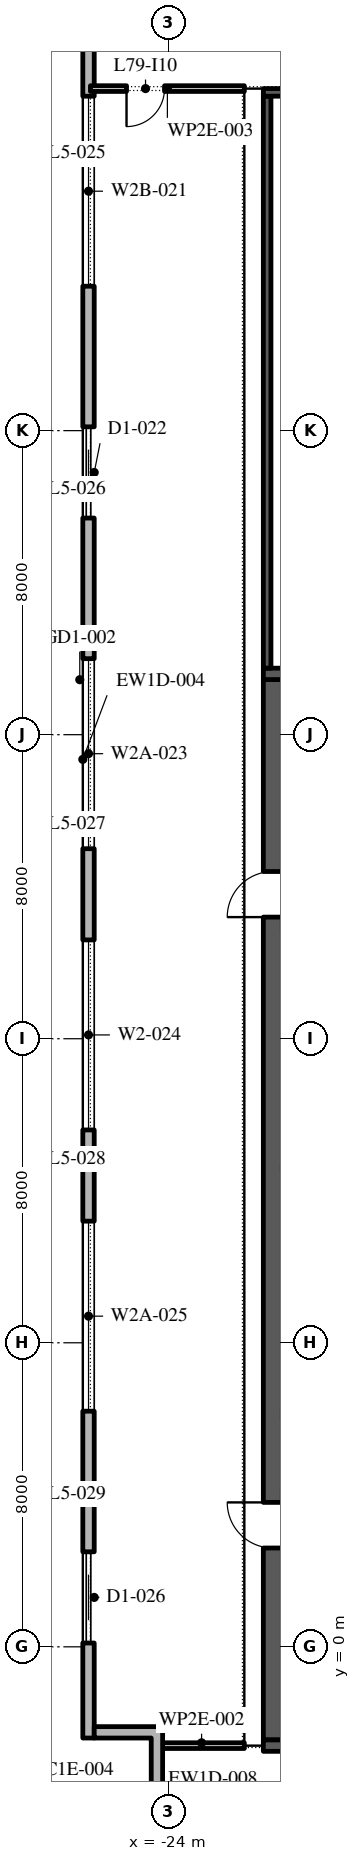
"""IFC4 building model, lengths in metres.
Left out: names, types, materials, properties, quantities, classifications, styles, units other than length and angle.
Written with IfcOpenShell. Run it as: python <this file> out.ifc"""

import sys

from ifc_helpers import new_model, si_unit, direction, frame, frame_2d, origin, place, context, subcontext, project, spatial, polyline, rectangle, outline, extrude, element, fill, save


model = new_model("IFC4")
c1 = context("Model", 3, precision=1e-05, world=origin(), true_north=direction((0.0, 1.0)))
c2 = subcontext(c1, "Body", "Model", "MODEL_VIEW")
j1 = project(units=[si_unit("LENGTHUNIT", "METRE"), si_unit("PLANEANGLEUNIT", "RADIAN")], contexts=[c1])
p1 = place(None, origin())
s1 = spatial("IfcSite", under=j1, at=p1, CompositionType="ELEMENT")
p2 = place(p1, origin())
s2 = spatial("IfcBuilding", under=s1, at=p2, CompositionType="ELEMENT")
p3 = place(p2, frame((0.0, 0.0, 359.4)))
s3 = spatial("IfcBuildingStorey", under=s2, at=p3, CompositionType="ELEMENT", Elevation=359.4)
p4 = place(p3, frame((-26.1, 49.1, 0.0), z_axis=(0.0, 0.0, 1.0), x_axis=(0.0, -1.0, 0.0)))
e1 = element("IfcWall", 1, at=p4, inside=s3, PredefinedType="STANDARD", context=c2, shape_type="SweptSolid", body=[
    extrude(rectangle(XDim=51.5, YDim=0.3, at=frame_2d((25.75, 0.0))), origin(), (0.0, 0.0, 1.0), 3.9),
])
p5 = place(p4, frame((1.05, 0.0, 0.45)))
e2 = element("IfcOpeningElement", 2, at=p5, cuts=e1, PredefinedType="OPENING", context=c2, shape_type="SweptSolid", body=[
    extrude(rectangle(XDim=5.0, YDim=3.25, at=frame_2d((2.5, 1.625))), frame((0.0, 0.16, 0.0), z_axis=(0.0, -1.0, 0.0), x_axis=(1.0, 0.0, 0.0)), (0.0, 0.0, 1.0), 0.32),
])
p6 = place(p4, frame((8.3, 0.0, 0.45)))
e3 = element("IfcOpeningElement", 3, at=p6, cuts=e1, PredefinedType="OPENING", context=c2, shape_type="SweptSolid", body=[
    extrude(rectangle(XDim=5.0, YDim=2.9, at=frame_2d((2.5, 1.45))), frame((0.0, 0.16, 0.0), z_axis=(0.0, -1.0, 0.0), x_axis=(1.0, 0.0, 0.0)), (0.0, 0.0, 1.0), 0.32),
])
p7 = place(p4, frame((17.0, 0.0, 0.0)))
e4 = element("IfcOpeningElement", 4, at=p7, cuts=e1, PredefinedType="OPENING", context=c2, shape_type="SweptSolid", body=[
    extrude(rectangle(XDim=2.4, YDim=3.5, at=frame_2d((1.2, 1.75))), frame((0.0, 0.16, 0.0), z_axis=(0.0, -1.0, 0.0), x_axis=(1.0, 0.0, 0.0)), (0.0, 0.0, 1.0), 0.32),
])
p8 = place(p4, frame((23.1, 0.0, 0.45)))
e5 = element("IfcOpeningElement", 5, at=p8, cuts=e1, PredefinedType="OPENING", context=c2, shape_type="SweptSolid", body=[
    extrude(rectangle(XDim=5.0, YDim=2.95, at=frame_2d((2.5, 1.475))), frame((0.0, 0.16, 0.0), z_axis=(0.0, -1.0, 0.0), x_axis=(1.0, 0.0, 0.0)), (0.0, 0.0, 1.0), 0.32),
])
p9 = place(p4, frame((30.5, 0.0, 0.45)))
e6 = element("IfcOpeningElement", 6, at=p9, cuts=e1, PredefinedType="OPENING", context=c2, shape_type="SweptSolid", body=[
    extrude(rectangle(XDim=5.0, YDim=3.25, at=frame_2d((2.5, 1.625))), frame((0.0, 0.16, 0.0), z_axis=(0.0, -1.0, 0.0), x_axis=(1.0, 0.0, 0.0)), (0.0, 0.0, 1.0), 0.32),
])
p10 = place(p4, frame((37.9, 0.0, 0.45)))
e7 = element("IfcOpeningElement", 7, at=p10, cuts=e1, PredefinedType="OPENING", context=c2, shape_type="SweptSolid", body=[
    extrude(rectangle(XDim=5.0, YDim=2.95, at=frame_2d((2.5, 1.475))), frame((0.0, 0.16, 0.0), z_axis=(0.0, -1.0, 0.0), x_axis=(1.0, 0.0, 0.0)), (0.0, 0.0, 1.0), 0.32),
])
p11 = place(p4, frame((46.6, 0.0, 0.0)))
e8 = element("IfcOpeningElement", 8, at=p11, cuts=e1, PredefinedType="OPENING", context=c2, shape_type="SweptSolid", body=[
    extrude(rectangle(XDim=2.4, YDim=3.5, at=frame_2d((1.2, 1.75))), frame((0.0, 0.16, 0.0), z_axis=(0.0, -1.0, 0.0), x_axis=(1.0, 0.0, 0.0)), (0.0, 0.0, 1.0), 0.32),
])
p12 = place(p3, origin())
e9 = element("IfcWall", 9, at=p12, inside=s3, PredefinedType="STANDARD", context=c2, shape_type="SweptSolid", body=[
    extrude(outline(polyline([(-22.65, -4.2), (-24.45, -4.2), (-24.45, -2.4), (-25.95, -2.4), (-25.95, -2.1), (-24.15, -2.1), (-24.15, -3.9), (-22.35, -3.9), (-22.35, -6.0), (-22.65, -6.0), (-22.65, -4.2)])), origin(), (0.0, 0.0, 1.0), 3.9),
])
p13 = place(p3, frame((-21.25, -2.45, 0.0), z_axis=(0.0, 0.0, 1.0), x_axis=(0.0, 1.0, 0.0)))
e10 = element("IfcWall", 10, at=p13, inside=s3, PredefinedType="SHEAR", context=c2, shape_type="SweptSolid", body=[
    extrude(rectangle(XDim=27.9, YDim=0.5, at=frame_2d((13.95, 0.0))), origin(), (0.0, 0.0, 1.0), 3.9),
])
p14 = place(p13, frame((5.05, 0.0, 0.0)))
e11 = element("IfcOpeningElement", 11, at=p14, cuts=e10, PredefinedType="OPENING", context=c2, shape_type="SweptSolid", body=[
    extrude(rectangle(XDim=1.2, YDim=2.1, at=frame_2d((0.6, 1.05))), frame((0.0, 0.26, 0.0), z_axis=(0.0, -1.0, 0.0), x_axis=(1.0, 0.0, 0.0)), (0.0, 0.0, 1.0), 0.52),
])
p15 = place(p13, frame((21.65, 0.0, 0.0)))
e12 = element("IfcOpeningElement", 12, at=p15, cuts=e10, PredefinedType="OPENING", context=c2, shape_type="SweptSolid", body=[
    extrude(rectangle(XDim=1.2, YDim=2.1, at=frame_2d((0.6, 1.05))), frame((0.0, 0.26, 0.0), z_axis=(0.0, -1.0, 0.0), x_axis=(1.0, 0.0, 0.0)), (0.0, 0.0, 1.0), 0.52),
])
for number, where, z_axis, x_axis in (
    (13, (-21.5, -2.6, 0.0), (0.0, 0.0, 1.0), (1.0, 0.0, 0.0)),
    (14, (-21.5, 25.6, 0.0), (0.0, 0.0, 1.0), (1.0, 0.0, 0.0)),
):
    element("IfcWall", number, at=place(p3, frame(where, z_axis=z_axis, x_axis=x_axis)), inside=s3, PredefinedType="SHEAR", context=c2, shape_type="SweptSolid", body=[
        extrude(rectangle(XDim=11.0, YDim=0.3, at=frame_2d((5.5, 0.0))), origin(), (0.0, 0.0, 1.0), 3.9),
    ])
p16 = place(p3, frame((-21.4, 25.75, 0.0), z_axis=(0.0, 0.0, 1.0), x_axis=(0.0, 1.0, 0.0)))
e15 = element("IfcWall", 15, at=p16, inside=s3, PredefinedType="SHEAR", context=c2, shape_type="SweptSolid", body=[
    extrude(rectangle(XDim=15.05, YDim=0.2, at=frame_2d((7.525, 0.0))), origin(), (0.0, 0.0, 1.0), 3.9),
])
p17 = place(p3, frame((-21.5, 40.9, 0.0), z_axis=(0.0, 0.0, 1.0), x_axis=(1.0, 0.0, 0.0)))
e16 = element("IfcWall", 16, at=p17, inside=s3, PredefinedType="SHEAR", context=c2, shape_type="SweptSolid", body=[
    extrude(rectangle(XDim=11.0, YDim=0.2, at=frame_2d((5.5, 0.0))), origin(), (0.0, 0.0, 1.0), 3.9),
])
p18 = place(p3, frame((-24.25, -2.6, 0.0), z_axis=(0.0, 0.0, 1.0), x_axis=(1.0, 0.0, 0.0)))
e17 = element("IfcWall", 17, at=p18, inside=s3, PredefinedType="PARTITIONING", context=c2, shape_type="SweptSolid", body=[
    extrude(rectangle(XDim=2.25, YDim=0.15, at=frame_2d((1.125, 0.0))), origin(), (0.0, 0.0, 1.0), 3.9),
])
p19 = place(p3, frame((-22.0, 41.0, 0.0), z_axis=(0.0, 0.0, 1.0), x_axis=(-1.0, 0.0, 0.0)))
e18 = element("IfcWall", 18, at=p19, inside=s3, PredefinedType="PARTITIONING", context=c2, shape_type="SweptSolid", body=[
    extrude(rectangle(XDim=4.05, YDim=0.15, at=frame_2d((2.025, 0.0))), origin(), (0.0, 0.0, 1.0), 3.9),
])
p20 = place(p19, frame((2.1, 0.0, 0.0)))
e19 = element("IfcOpeningElement", 19, at=p20, cuts=e18, PredefinedType="OPENING", context=c2, shape_type="SweptSolid", body=[
    extrude(rectangle(XDim=1.0, YDim=2.1, at=frame_2d((0.5, 1.05))), frame((0.0, 0.085, 0.0), z_axis=(0.0, -1.0, 0.0), x_axis=(1.0, 0.0, 0.0)), (0.0, 0.0, 1.0), 0.17),
])
p21 = place(p6, origin())
e20 = element("IfcWindow", 20, at=p21, inside=s3, PartitioningType="DOUBLE_PANEL_VERTICAL", PredefinedType="WINDOW", context=c2, shape_type="SweptSolid", body=[
    extrude(rectangle(XDim=5.0, YDim=2.9, at=frame_2d((2.5, 1.45))), frame((0.0, 0.03, 0.0), z_axis=(0.0, -1.0, 0.0), x_axis=(1.0, 0.0, 0.0)), (0.0, 0.0, 1.0), 0.06),
])
fill(e3, e20)
p22 = place(p7, origin())
e21 = element("IfcDoor", 21, at=p22, inside=s3, OperationType="DOUBLE_DOOR_SLIDING", PredefinedType="DOOR", context=c2, shape_type="SweptSolid", body=[
    extrude(rectangle(XDim=2.4, YDim=3.5, at=frame_2d((1.2, 1.75))), frame((0.0, 0.025, 0.0), z_axis=(0.0, -1.0, 0.0), x_axis=(1.0, 0.0, 0.0)), (0.0, 0.0, 1.0), 0.05),
])
fill(e4, e21)
p23 = place(p8, origin())
e22 = element("IfcWindow", 22, at=p23, inside=s3, PartitioningType="DOUBLE_PANEL_VERTICAL", PredefinedType="WINDOW", context=c2, shape_type="SweptSolid", body=[
    extrude(rectangle(XDim=5.0, YDim=2.95, at=frame_2d((2.5, 1.475))), frame((0.0, 0.03, 0.0), z_axis=(0.0, -1.0, 0.0), x_axis=(1.0, 0.0, 0.0)), (0.0, 0.0, 1.0), 0.06),
])
fill(e5, e22)
p24 = place(p9, origin())
e23 = element("IfcWindow", 23, at=p24, inside=s3, PartitioningType="DOUBLE_PANEL_VERTICAL", PredefinedType="WINDOW", context=c2, shape_type="SweptSolid", body=[
    extrude(rectangle(XDim=5.0, YDim=3.25, at=frame_2d((2.5, 1.625))), frame((0.0, 0.03, 0.0), z_axis=(0.0, -1.0, 0.0), x_axis=(1.0, 0.0, 0.0)), (0.0, 0.0, 1.0), 0.06),
])
fill(e6, e23)
p25 = place(p10, origin())
e24 = element("IfcWindow", 24, at=p25, inside=s3, PartitioningType="DOUBLE_PANEL_VERTICAL", PredefinedType="WINDOW", context=c2, shape_type="SweptSolid", body=[
    extrude(rectangle(XDim=5.0, YDim=2.95, at=frame_2d((2.5, 1.475))), frame((0.0, 0.03, 0.0), z_axis=(0.0, -1.0, 0.0), x_axis=(1.0, 0.0, 0.0)), (0.0, 0.0, 1.0), 0.06),
])
fill(e7, e24)
p26 = place(p11, origin())
e25 = element("IfcDoor", 25, at=p26, inside=s3, OperationType="DOUBLE_DOOR_SLIDING", PredefinedType="DOOR", context=c2, shape_type="SweptSolid", body=[
    extrude(rectangle(XDim=2.4, YDim=3.5, at=frame_2d((1.2, 1.75))), frame((0.0, 0.025, 0.0), z_axis=(0.0, -1.0, 0.0), x_axis=(1.0, 0.0, 0.0)), (0.0, 0.0, 1.0), 0.05),
])
fill(e8, e25)
p27 = place(p14, origin())
e26 = element("IfcDoor", 26, at=p27, inside=s3, OperationType="SINGLE_SWING_LEFT", PredefinedType="DOOR", context=c2, shape_type="SweptSolid", body=[
    extrude(rectangle(XDim=1.2, YDim=2.1, at=frame_2d((0.6, 1.05))), frame((0.0, 0.025, 0.0), z_axis=(0.0, -1.0, 0.0), x_axis=(1.0, 0.0, 0.0)), (0.0, 0.0, 1.0), 0.05),
])
fill(e11, e26)
p28 = place(p15, origin())
e27 = element("IfcDoor", 27, at=p28, inside=s3, OperationType="SINGLE_SWING_RIGHT", PredefinedType="DOOR", context=c2, shape_type="SweptSolid", body=[
    extrude(rectangle(XDim=1.2, YDim=2.1, at=frame_2d((0.6, 1.05))), frame((0.0, 0.025, 0.0), z_axis=(0.0, -1.0, 0.0), x_axis=(1.0, 0.0, 0.0)), (0.0, 0.0, 1.0), 0.05),
])
fill(e12, e27)
p29 = place(p20, origin())
e28 = element("IfcDoor", 28, at=p29, inside=s3, OperationType="SINGLE_SWING_LEFT", PredefinedType="DOOR", context=c2, shape_type="SweptSolid", body=[
    extrude(rectangle(XDim=1.0, YDim=2.1, at=frame_2d((0.5, 1.05))), frame((0.0, 0.025, 0.0), z_axis=(0.0, -1.0, 0.0), x_axis=(1.0, 0.0, 0.0)), (0.0, 0.0, 1.0), 0.05),
])
fill(e19, e28)
save(model, sys.argv[1])
